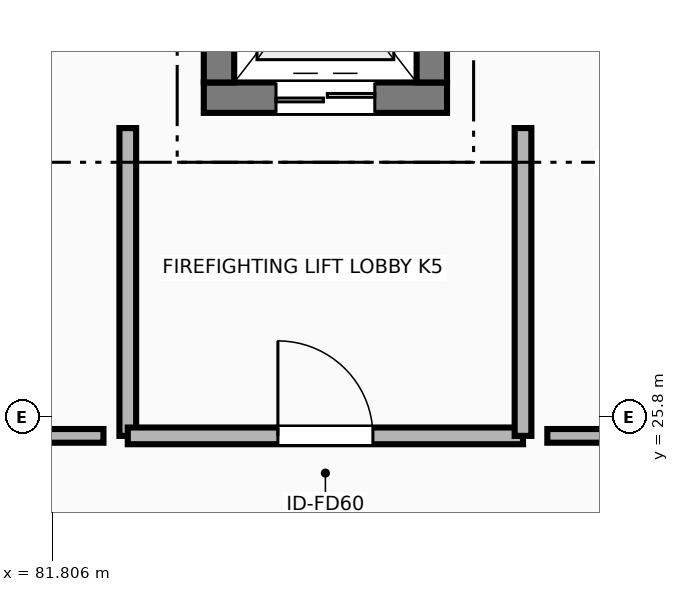
"""IFC4 building model, lengths in metres.
Left out: names, types, materials, properties, quantities, classifications, styles, units other than length and angle.
Written with IfcOpenShell. Run it as: python <this file> out.ifc"""

import sys

from ifc_helpers import new_model, si_unit, direction, frame, frame_2d, origin, place, context, subcontext, project, spatial, rectangle, extrude, element, fill, save


model = new_model("IFC4")
c1 = context("Model", 3, precision=1e-05, world=origin(), true_north=direction((0.0, 1.0)))
c2 = subcontext(c1, "Body", "Model", "MODEL_VIEW")
j1 = project(units=[si_unit("LENGTHUNIT", "METRE"), si_unit("PLANEANGLEUNIT", "RADIAN")], contexts=[c1])
p1 = place(None, origin())
s1 = spatial("IfcSite", under=j1, at=p1, CompositionType="ELEMENT")
p2 = place(p1, origin())
s2 = spatial("IfcBuilding", under=s1, at=p2, CompositionType="ELEMENT")
p3 = place(p2, frame((0.0, 0.0, 5.4)))
s3 = spatial("IfcBuildingStorey", under=s2, at=p3, CompositionType="ELEMENT", Elevation=5.4)
p4 = place(p3, frame((83.8, 30.0, 0.0), z_axis=(0.0, 0.0, 1.0), x_axis=(1.0, 0.0, 0.0)))
e1 = element("IfcWall", 1, at=p4, inside=s3, PredefinedType="SHEAR", context=c2, shape_type="SweptSolid", body=[
    extrude(rectangle(XDim=3.2, YDim=0.4, at=frame_2d((1.6, 0.0))), origin(), (0.0, 0.0, 1.0), 4.2),
])
p5 = place(p4, frame((0.95, 0.0, 0.0)))
e2 = element("IfcOpeningElement", 2, at=p5, cuts=e1, PredefinedType="OPENING", context=c2, shape_type="SweptSolid", body=[
    extrude(rectangle(XDim=1.3, YDim=2.25, at=frame_2d((0.65, 1.125))), frame((0.0, 0.21, 0.0), z_axis=(0.0, -1.0, 0.0), x_axis=(1.0, 0.0, 0.0)), (0.0, 0.0, 1.0), 0.42),
])
for number, where, z_axis, x_axis in (
    (3, (84.0, 30.2, 0.0), (0.0, 0.0, 1.0), (0.0, 1.0, 0.0)),
    (4, (86.8, 33.3, 0.0), (0.0, 0.0, 1.0), (0.0, -1.0, 0.0)),
):
    element("IfcWall", number, at=place(p3, frame(where, z_axis=z_axis, x_axis=x_axis)), inside=s3, PredefinedType="SHEAR", context=c2, shape_type="SweptSolid", body=[
        extrude(rectangle(XDim=3.1, YDim=0.4, at=frame_2d((1.55, 0.0))), origin(), (0.0, 0.0, 1.0), 4.2),
    ])
p6 = place(p3, frame((82.8, 29.6, 0.0), z_axis=(0.0, 0.0, 1.0), x_axis=(0.0, -1.0, 0.0)))
e5 = element("IfcWall", 5, at=p6, inside=s3, PredefinedType="PARTITIONING", context=c2, shape_type="SweptSolid", body=[
    extrude(rectangle(XDim=4.05, YDim=0.22, at=frame_2d((2.025, 0.0))), origin(), (0.0, 0.0, 1.0), 3.92),
])
p7 = place(p3, frame((82.8, 25.55, 0.0), z_axis=(0.0, 0.0, 1.0), x_axis=(1.0, 0.0, 0.0)))
e6 = element("IfcWall", 6, at=p7, inside=s3, PredefinedType="PARTITIONING", context=c2, shape_type="SweptSolid", body=[
    extrude(rectangle(XDim=5.2, YDim=0.22, at=frame_2d((2.6, 0.0))), origin(), (0.0, 0.0, 1.0), 3.225),
])
p8 = place(p7, frame((1.975, 0.0, 0.0)))
e7 = element("IfcOpeningElement", 7, at=p8, cuts=e6, PredefinedType="OPENING", context=c2, shape_type="SweptSolid", body=[
    extrude(rectangle(XDim=1.25, YDim=2.2, at=frame_2d((0.625, 1.1))), frame((0.0, 0.12, 0.0), z_axis=(0.0, -1.0, 0.0), x_axis=(1.0, 0.0, 0.0)), (0.0, 0.0, 1.0), 0.24),
])
p9 = place(p3, frame((88.0, 25.55, 0.0), z_axis=(0.0, 0.0, 1.0), x_axis=(0.0, 1.0, 0.0)))
e8 = element("IfcWall", 8, at=p9, inside=s3, PredefinedType="PARTITIONING", context=c2, shape_type="SweptSolid", body=[
    extrude(rectangle(XDim=4.05, YDim=0.22, at=frame_2d((2.025, 0.0))), origin(), (0.0, 0.0, 1.0), 3.92),
])
p10 = place(p3, frame((82.48, 25.55, 0.0), z_axis=(0.0, 0.0, 1.0), x_axis=(-1.0, 0.0, 0.0)))
e9 = element("IfcWall", 9, at=p10, inside=s3, PredefinedType="PARTITIONING", context=c2, shape_type="SweptSolid", body=[
    extrude(rectangle(XDim=1.52, YDim=0.18, at=frame_2d((0.76, 0.0))), origin(), (0.0, 0.0, 1.0), 3.225),
])
p11 = place(p3, frame((90.1, 25.55, 0.0), z_axis=(0.0, 0.0, 1.0), x_axis=(-1.0, 0.0, 0.0)))
e10 = element("IfcWall", 10, at=p11, inside=s3, PredefinedType="PARTITIONING", context=c2, shape_type="SweptSolid", body=[
    extrude(rectangle(XDim=1.78, YDim=0.18, at=frame_2d((0.89, 0.0))), origin(), (0.0, 0.0, 1.0), 3.225),
])
p12 = place(p5, origin())
e11 = element("IfcDoor", 11, at=p12, inside=s3, OperationType="DOUBLE_DOOR_SLIDING", PredefinedType="DOOR", context=c2, shape_type="SweptSolid", body=[
    extrude(rectangle(XDim=1.3, YDim=2.25, at=frame_2d((0.65, 1.125))), frame((0.0, 0.025, 0.0), z_axis=(0.0, -1.0, 0.0), x_axis=(1.0, 0.0, 0.0)), (0.0, 0.0, 1.0), 0.05),
])
fill(e2, e11)
p13 = place(p8, origin())
e12 = element("IfcDoor", 12, at=p13, inside=s3, OperationType="SINGLE_SWING_LEFT", PredefinedType="DOOR", context=c2, shape_type="SweptSolid", body=[
    extrude(rectangle(XDim=1.25, YDim=2.2, at=frame_2d((0.625, 1.1))), frame((0.0, 0.025, 0.0), z_axis=(0.0, -1.0, 0.0), x_axis=(1.0, 0.0, 0.0)), (0.0, 0.0, 1.0), 0.05),
])
fill(e7, e12)
save(model, sys.argv[1])
